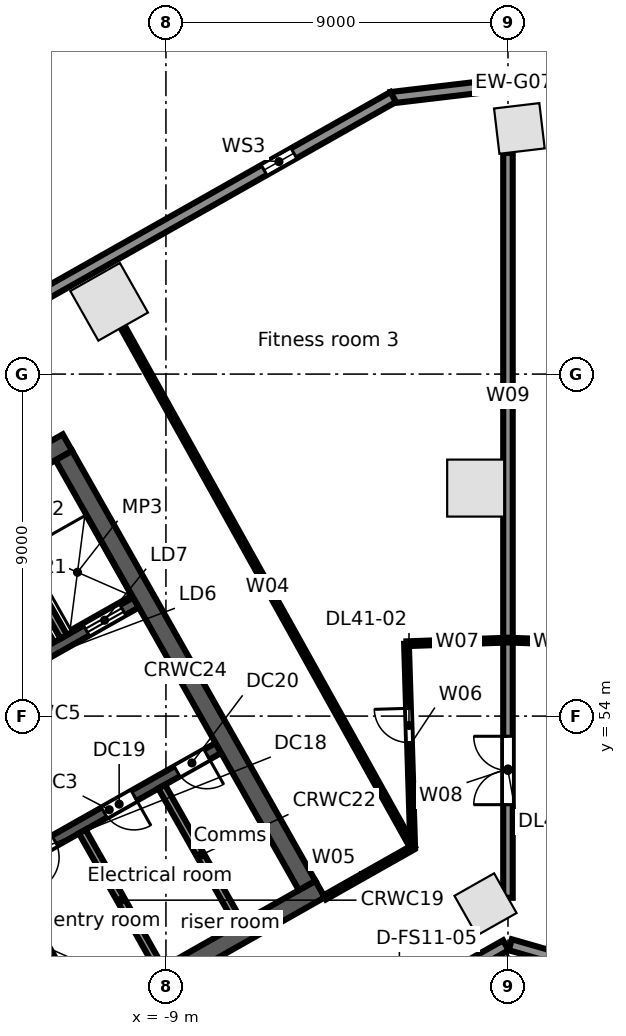
"""IFC4 building model, lengths in metres.
Left out: names, types, materials, properties, quantities, classifications, styles, units other than length and angle.
Written with IfcOpenShell. Run it as: python <this file> out.ifc"""

import sys

from ifc_helpers import new_model, si_unit, direction, frame, frame_2d, origin, origin_2d, place, context, subcontext, project, spatial, rectangle, extrude, element, fill, save


model = new_model("IFC4")
c1 = context("Model", 3, precision=1e-05, world=origin(), true_north=direction((0.0, 1.0)))
c2 = subcontext(c1, "Body", "Model", "MODEL_VIEW")
j1 = project(units=[si_unit("LENGTHUNIT", "METRE"), si_unit("PLANEANGLEUNIT", "RADIAN")], contexts=[c1])
p1 = place(None, origin())
s1 = spatial("IfcSite", under=j1, at=p1, CompositionType="ELEMENT")
p2 = place(p1, origin())
s2 = spatial("IfcBuilding", under=s1, at=p2, CompositionType="ELEMENT")
p3 = place(p2, frame((0.0, 0.0, 190.9)))
s3 = spatial("IfcBuildingStorey", under=s2, at=p3, CompositionType="ELEMENT", Elevation=190.9)
p4 = place(p3, frame((0.3, 69.464, 0.0), z_axis=(0.0, 0.0, 1.0), x_axis=(-0.993068456955, -0.117537397458, 0.0)))
e1 = element("IfcColumn", 1, at=p4, inside=s3, PredefinedType="COLUMN", context=c2, shape_type="SweptSolid", body=[
    extrude(rectangle(XDim=1.2, YDim=1.2, at=origin_2d()), origin(), (0.0, 0.0, 1.0), 4.0),
])
p5 = place(p3, frame((-10.495, 64.902, 0.0), z_axis=(0.0, 0.0, 1.0), x_axis=(-0.87035569594, -0.492423560103, 0.0)))
e2 = element("IfcColumn", 2, at=p5, inside=s3, PredefinedType="COLUMN", context=c2, shape_type="SweptSolid", body=[
    extrude(rectangle(XDim=1.5, YDim=1.5, at=origin_2d()), origin(), (0.0, 0.0, 1.0), 4.0),
])
p6 = place(p3, frame((-0.591, 49.044, 0.0), z_axis=(0.0, 0.0, 1.0), x_axis=(0.87035569594, 0.492423560103, 0.0)))
e3 = element("IfcColumn", 3, at=p6, inside=s3, PredefinedType="COLUMN", context=c2, shape_type="SweptSolid", body=[
    extrude(rectangle(XDim=1.2, YDim=1.2, at=origin_2d()), origin(), (0.0, 0.0, 1.0), 4.0),
])
p7 = place(p3, frame((-0.85, 60.0, 0.0), z_axis=(0.0, 0.0, 1.0), x_axis=(0.0, 1.0, 0.0)))
e4 = element("IfcColumn", 4, at=p7, inside=s3, PredefinedType="COLUMN", context=c2, shape_type="SweptSolid", body=[
    extrude(rectangle(XDim=1.5, YDim=1.5, at=origin_2d()), origin(), (0.0, 0.0, 1.0), 4.0),
])
p8 = place(p3, frame((-0.055, 47.969, 0.0), z_axis=(0.0, 0.0, 1.0), x_axis=(-0.870355730478, -0.492423499058, 0.0)))
e5 = element("IfcWall", 5, at=p8, inside=s3, PredefinedType="STANDARD", context=c2, shape_type="SweptSolid", body=[
    extrude(rectangle(XDim=43.75, YDim=0.3, at=frame_2d((21.875, 0.0))), origin(), (0.0, 0.0, 1.0), 3.68),
])
p9 = place(p8, frame((39.977, 0.0, 0.6)))
e6 = element("IfcOpeningElement", 6, at=p9, cuts=e5, PredefinedType="OPENING", context=c2, shape_type="SweptSolid", body=[
    extrude(rectangle(XDim=0.9, YDim=2.4, at=frame_2d((0.45, 1.2))), frame((0.0, 0.16, 0.0), z_axis=(0.0, -1.0, 0.0), x_axis=(1.0, 0.0, 0.0)), (0.0, 0.0, 1.0), 0.32),
])
p10 = place(p8, frame((37.338, 0.0, 0.0)))
e7 = element("IfcOpeningElement", 7, at=p10, cuts=e5, PredefinedType="OPENING", context=c2, shape_type="SweptSolid", body=[
    extrude(rectangle(XDim=1.8, YDim=2.4, at=frame_2d((0.9, 1.2))), frame((0.0, 0.16, 0.0), z_axis=(0.0, -1.0, 0.0), x_axis=(1.0, 0.0, 0.0)), (0.0, 0.0, 1.0), 0.32),
])
p11 = place(p8, frame((31.222, 0.0, 0.6)))
e8 = element("IfcOpeningElement", 8, at=p11, cuts=e5, PredefinedType="OPENING", context=c2, shape_type="SweptSolid", body=[
    extrude(rectangle(XDim=0.9, YDim=2.4, at=frame_2d((0.45, 1.2))), frame((0.0, 0.16, 0.0), z_axis=(0.0, -1.0, 0.0), x_axis=(1.0, 0.0, 0.0)), (0.0, 0.0, 1.0), 0.32),
])
p12 = place(p8, frame((28.584, 0.0, 0.0)))
e9 = element("IfcOpeningElement", 9, at=p12, cuts=e5, PredefinedType="OPENING", context=c2, shape_type="SweptSolid", body=[
    extrude(rectangle(XDim=1.8, YDim=2.4, at=frame_2d((0.9, 1.2))), frame((0.0, 0.16, 0.0), z_axis=(0.0, -1.0, 0.0), x_axis=(1.0, 0.0, 0.0)), (0.0, 0.0, 1.0), 0.32),
])
p13 = place(p8, frame((22.468, 0.0, 0.6)))
e10 = element("IfcOpeningElement", 10, at=p13, cuts=e5, PredefinedType="OPENING", context=c2, shape_type="SweptSolid", body=[
    extrude(rectangle(XDim=0.9, YDim=2.4, at=frame_2d((0.45, 1.2))), frame((0.0, 0.16, 0.0), z_axis=(0.0, -1.0, 0.0), x_axis=(1.0, 0.0, 0.0)), (0.0, 0.0, 1.0), 0.32),
])
p14 = place(p8, frame((19.829, 0.0, 0.0)))
e11 = element("IfcOpeningElement", 11, at=p14, cuts=e5, PredefinedType="OPENING", context=c2, shape_type="SweptSolid", body=[
    extrude(rectangle(XDim=1.8, YDim=2.4, at=frame_2d((0.9, 1.2))), frame((0.0, 0.16, 0.0), z_axis=(0.0, -1.0, 0.0), x_axis=(1.0, 0.0, 0.0)), (0.0, 0.0, 1.0), 0.32),
])
p15 = place(p8, frame((13.713, 0.0, 0.6)))
e12 = element("IfcOpeningElement", 12, at=p15, cuts=e5, PredefinedType="OPENING", context=c2, shape_type="SweptSolid", body=[
    extrude(rectangle(XDim=0.9, YDim=2.4, at=frame_2d((0.45, 1.2))), frame((0.0, 0.16, 0.0), z_axis=(0.0, -1.0, 0.0), x_axis=(1.0, 0.0, 0.0)), (0.0, 0.0, 1.0), 0.32),
])
p16 = place(p8, frame((11.075, 0.0, 0.0)))
e13 = element("IfcOpeningElement", 13, at=p16, cuts=e5, PredefinedType="OPENING", context=c2, shape_type="SweptSolid", body=[
    extrude(rectangle(XDim=1.8, YDim=2.4, at=frame_2d((0.9, 1.2))), frame((0.0, 0.16, 0.0), z_axis=(0.0, -1.0, 0.0), x_axis=(1.0, 0.0, 0.0)), (0.0, 0.0, 1.0), 0.32),
])
p17 = place(p8, frame((4.959, 0.0, 0.6)))
e14 = element("IfcOpeningElement", 14, at=p17, cuts=e5, PredefinedType="OPENING", context=c2, shape_type="SweptSolid", body=[
    extrude(rectangle(XDim=0.9, YDim=2.4, at=frame_2d((0.45, 1.2))), frame((0.0, 0.16, 0.0), z_axis=(0.0, -1.0, 0.0), x_axis=(1.0, 0.0, 0.0)), (0.0, 0.0, 1.0), 0.32),
])
p18 = place(p8, frame((2.32, 0.0, 0.0)))
e15 = element("IfcOpeningElement", 15, at=p18, cuts=e5, PredefinedType="OPENING", context=c2, shape_type="SweptSolid", body=[
    extrude(rectangle(XDim=1.8, YDim=2.4, at=frame_2d((0.9, 1.2))), frame((0.0, 0.16, 0.0), z_axis=(0.0, -1.0, 0.0), x_axis=(1.0, 0.0, 0.0)), (0.0, 0.0, 1.0), 0.32),
])
p19 = place(p3, frame((24.042, 41.106, 0.0), z_axis=(0.0, 0.0, 1.0), x_axis=(-0.961261693976, 0.275637362661, 0.0)))
e16 = element("IfcWall", 16, at=p19, inside=s3, PredefinedType="STANDARD", context=c2, shape_type="SweptSolid", body=[
    extrude(rectangle(XDim=24.948, YDim=0.3, at=frame_2d((12.474, 0.0))), origin(), (0.0, 0.0, 1.0), 3.68),
])
p20 = place(p19, frame((21.441, 0.0, 0.6)))
e17 = element("IfcOpeningElement", 17, at=p20, cuts=e16, PredefinedType="OPENING", context=c2, shape_type="SweptSolid", body=[
    extrude(rectangle(XDim=0.9, YDim=2.4, at=frame_2d((0.45, 1.2))), frame((0.0, 0.16, 0.0), z_axis=(0.0, -1.0, 0.0), x_axis=(1.0, 0.0, 0.0)), (0.0, 0.0, 1.0), 0.32),
])
p21 = place(p19, frame((13.121, 0.0, 0.6)))
e18 = element("IfcOpeningElement", 18, at=p21, cuts=e16, PredefinedType="OPENING", context=c2, shape_type="SweptSolid", body=[
    extrude(rectangle(XDim=0.9, YDim=2.4, at=frame_2d((0.45, 1.2))), frame((0.0, 0.16, 0.0), z_axis=(0.0, -1.0, 0.0), x_axis=(1.0, 0.0, 0.0)), (0.0, 0.0, 1.0), 0.32),
])
p22 = place(p19, frame((10.591, 0.0, 0.0)))
e19 = element("IfcOpeningElement", 19, at=p22, cuts=e16, PredefinedType="OPENING", context=c2, shape_type="SweptSolid", body=[
    extrude(rectangle(XDim=1.8, YDim=2.4, at=frame_2d((0.9, 1.2))), frame((0.0, 0.16, 0.0), z_axis=(0.0, -1.0, 0.0), x_axis=(1.0, 0.0, 0.0)), (0.0, 0.0, 1.0), 0.32),
])
p23 = place(p19, frame((4.8, 0.0, 0.6)))
e20 = element("IfcOpeningElement", 20, at=p23, cuts=e16, PredefinedType="OPENING", context=c2, shape_type="SweptSolid", body=[
    extrude(rectangle(XDim=0.9, YDim=2.4, at=frame_2d((0.45, 1.2))), frame((0.0, 0.16, 0.0), z_axis=(0.0, -1.0, 0.0), x_axis=(1.0, 0.0, 0.0)), (0.0, 0.0, 1.0), 0.32),
])
p24 = place(p19, frame((2.27, 0.0, 0.0)))
e21 = element("IfcOpeningElement", 21, at=p24, cuts=e16, PredefinedType="OPENING", context=c2, shape_type="SweptSolid", body=[
    extrude(rectangle(XDim=1.8, YDim=2.4, at=frame_2d((0.9, 1.2))), frame((0.0, 0.16, 0.0), z_axis=(0.0, -1.0, 0.0), x_axis=(1.0, 0.0, 0.0)), (0.0, 0.0, 1.0), 0.32),
])
p25 = place(p3, frame((-3.076, 70.273, 0.0), z_axis=(0.0, 0.0, 1.0), x_axis=(0.993067743007, 0.117543429416, 0.0)))
e22 = element("IfcWall", 22, at=p25, inside=s3, PredefinedType="STANDARD", context=c2, shape_type="SweptSolid", body=[
    extrude(rectangle(XDim=6.516, YDim=0.3, at=frame_2d((3.258, 0.0))), origin(), (0.0, 0.0, 1.0), 3.68),
])
p26 = place(p3, frame((-58.745, 38.764, 0.0), z_axis=(0.0, 0.0, 1.0), x_axis=(0.870355811726, 0.492423355453, 0.0)))
e23 = element("IfcWall", 23, at=p26, inside=s3, PredefinedType="STANDARD", context=c2, shape_type="SweptSolid", body=[
    extrude(rectangle(XDim=64.025, YDim=0.3, at=frame_2d((32.013, 0.0))), origin(), (0.0, 0.0, 1.0), 3.68),
])
p27 = place(p26, frame((60.122, 0.0, 0.6)))
e24 = element("IfcOpeningElement", 24, at=p27, cuts=e23, PredefinedType="OPENING", context=c2, shape_type="SweptSolid", body=[
    extrude(rectangle(XDim=0.9, YDim=2.4, at=frame_2d((0.45, 1.2))), frame((0.0, 0.16, 0.0), z_axis=(0.0, -1.0, 0.0), x_axis=(1.0, 0.0, 0.0)), (0.0, 0.0, 1.0), 0.32),
])
p28 = place(p26, frame((50.992, 0.0, 0.6)))
e25 = element("IfcOpeningElement", 25, at=p28, cuts=e23, PredefinedType="OPENING", context=c2, shape_type="SweptSolid", body=[
    extrude(rectangle(XDim=0.9, YDim=2.4, at=frame_2d((0.45, 1.2))), frame((0.0, 0.16, 0.0), z_axis=(0.0, -1.0, 0.0), x_axis=(1.0, 0.0, 0.0)), (0.0, 0.0, 1.0), 0.32),
])
p29 = place(p26, frame((41.862, 0.0, 0.6)))
e26 = element("IfcOpeningElement", 26, at=p29, cuts=e23, PredefinedType="OPENING", context=c2, shape_type="SweptSolid", body=[
    extrude(rectangle(XDim=0.9, YDim=2.4, at=frame_2d((0.45, 1.2))), frame((0.0, 0.16, 0.0), z_axis=(0.0, -1.0, 0.0), x_axis=(1.0, 0.0, 0.0)), (0.0, 0.0, 1.0), 0.32),
])
p30 = place(p26, frame((32.732, 0.0, 0.6)))
e27 = element("IfcOpeningElement", 27, at=p30, cuts=e23, PredefinedType="OPENING", context=c2, shape_type="SweptSolid", body=[
    extrude(rectangle(XDim=0.9, YDim=2.4, at=frame_2d((0.45, 1.2))), frame((0.0, 0.16, 0.0), z_axis=(0.0, -1.0, 0.0), x_axis=(1.0, 0.0, 0.0)), (0.0, 0.0, 1.0), 0.32),
])
p31 = place(p26, frame((23.602, 0.0, 0.6)))
e28 = element("IfcOpeningElement", 28, at=p31, cuts=e23, PredefinedType="OPENING", context=c2, shape_type="SweptSolid", body=[
    extrude(rectangle(XDim=0.9, YDim=2.4, at=frame_2d((0.45, 1.2))), frame((0.0, 0.16, 0.0), z_axis=(0.0, -1.0, 0.0), x_axis=(1.0, 0.0, 0.0)), (0.0, 0.0, 1.0), 0.32),
])
p32 = place(p26, frame((14.472, 0.0, 0.6)))
e29 = element("IfcOpeningElement", 29, at=p32, cuts=e23, PredefinedType="OPENING", context=c2, shape_type="SweptSolid", body=[
    extrude(rectangle(XDim=0.9, YDim=2.4, at=frame_2d((0.45, 1.2))), frame((0.0, 0.16, 0.0), z_axis=(0.0, -1.0, 0.0), x_axis=(1.0, 0.0, 0.0)), (0.0, 0.0, 1.0), 0.32),
])
p33 = place(p26, frame((5.342, 0.0, 0.6)))
e30 = element("IfcOpeningElement", 30, at=p33, cuts=e23, PredefinedType="OPENING", context=c2, shape_type="SweptSolid", body=[
    extrude(rectangle(XDim=0.9, YDim=2.4, at=frame_2d((0.45, 1.2))), frame((0.0, 0.16, 0.0), z_axis=(0.0, -1.0, 0.0), x_axis=(1.0, 0.0, 0.0)), (0.0, 0.0, 1.0), 0.32),
])
p34 = place(p3, frame((-18.0, 42.061, 0.0), z_axis=(0.0, 0.0, 1.0), x_axis=(0.870356627484, 0.492421913601, 0.0)))
e31 = element("IfcWall", 31, at=p34, inside=s3, PredefinedType="SOLIDWALL", context=c2, shape_type="SweptSolid", body=[
    extrude(rectangle(XDim=15.0, YDim=0.5, at=frame_2d((7.5, 0.0))), origin(), (0.0, 0.0, 1.0), 3.68),
])
p35 = place(p34, frame((6.1, 0.0, 0.0)))
e32 = element("IfcOpeningElement", 32, at=p35, cuts=e31, PredefinedType="OPENING", context=c2, shape_type="SweptSolid", body=[
    extrude(rectangle(XDim=1.2, YDim=2.1, at=frame_2d((0.6, 1.05))), frame((0.0, 0.26, 0.0), z_axis=(0.0, -1.0, 0.0), x_axis=(1.0, 0.0, 0.0)), (0.0, 0.0, 1.0), 0.52),
])
p36 = place(p3, frame((-13.365, 49.911, 0.0), z_axis=(0.0, 0.0, 1.0), x_axis=(0.870356769198, 0.492421663121, 0.0)))
e33 = element("IfcWall", 33, at=p36, inside=s3, PredefinedType="SOLIDWALL", context=c2, shape_type="SweptSolid", body=[
    extrude(rectangle(XDim=6.6, YDim=0.3, at=frame_2d((3.3, 0.0))), origin(), (0.0, 0.0, 1.0), 3.68),
])
p37 = place(p36, frame((0.75, 0.0, 0.0)))
e34 = element("IfcOpeningElement", 34, at=p37, cuts=e33, PredefinedType="OPENING", context=c2, shape_type="SweptSolid", body=[
    extrude(rectangle(XDim=0.9, YDim=2.1, at=frame_2d((0.45, 1.05))), frame((0.0, 0.16, 0.0), z_axis=(0.0, -1.0, 0.0), x_axis=(1.0, 0.0, 0.0)), (0.0, 0.0, 1.0), 0.32),
])
p38 = place(p36, frame((3.15, 0.0, 0.0)))
e35 = element("IfcOpeningElement", 35, at=p38, cuts=e33, PredefinedType="OPENING", context=c2, shape_type="SweptSolid", body=[
    extrude(rectangle(XDim=0.9, YDim=2.1, at=frame_2d((0.45, 1.05))), frame((0.0, 0.16, 0.0), z_axis=(0.0, -1.0, 0.0), x_axis=(1.0, 0.0, 0.0)), (0.0, 0.0, 1.0), 0.32),
])
p39 = place(p36, frame((5.35, 0.0, 0.0)))
e36 = element("IfcOpeningElement", 36, at=p39, cuts=e33, PredefinedType="OPENING", context=c2, shape_type="SweptSolid", body=[
    extrude(rectangle(XDim=0.9, YDim=2.1, at=frame_2d((0.45, 1.05))), frame((0.0, 0.16, 0.0), z_axis=(0.0, -1.0, 0.0), x_axis=(1.0, 0.0, 0.0)), (0.0, 0.0, 1.0), 0.32),
])
p40 = place(p3, frame((-15.618, 53.691, 0.0), z_axis=(0.0, 0.0, 1.0), x_axis=(0.870363236066, 0.492410232738, 0.0)))
e37 = element("IfcWall", 37, at=p40, inside=s3, PredefinedType="SOLIDWALL", context=c2, shape_type="SweptSolid", body=[
    extrude(rectangle(XDim=6.7, YDim=0.3, at=frame_2d((3.35, 0.0))), origin(), (0.0, 0.0, 1.0), 3.68),
])
p41 = place(p40, frame((0.6, 0.0, 0.0)))
e38 = element("IfcOpeningElement", 38, at=p41, cuts=e37, PredefinedType="OPENING", context=c2, shape_type="SweptSolid", body=[
    extrude(rectangle(XDim=1.1, YDim=2.1, at=frame_2d((0.55, 1.05))), frame((0.0, 0.16, 0.0), z_axis=(0.0, -1.0, 0.0), x_axis=(1.0, 0.0, 0.0)), (0.0, 0.0, 1.0), 0.32),
])
p42 = place(p40, frame((2.9, 0.0, 0.0)))
e39 = element("IfcOpeningElement", 39, at=p42, cuts=e37, PredefinedType="OPENING", context=c2, shape_type="SweptSolid", body=[
    extrude(rectangle(XDim=1.1, YDim=2.1, at=frame_2d((0.55, 1.05))), frame((0.0, 0.16, 0.0), z_axis=(0.0, -1.0, 0.0), x_axis=(1.0, 0.0, 0.0)), (0.0, 0.0, 1.0), 0.32),
])
p43 = place(p40, frame((5.2, 0.0, 0.0)))
e40 = element("IfcOpeningElement", 40, at=p43, cuts=e37, PredefinedType="OPENING", context=c2, shape_type="SweptSolid", body=[
    extrude(rectangle(XDim=1.1, YDim=2.1, at=frame_2d((0.55, 1.05))), frame((0.0, 0.16, 0.0), z_axis=(0.0, -1.0, 0.0), x_axis=(1.0, 0.0, 0.0)), (0.0, 0.0, 1.0), 0.32),
])
p44 = place(p3, frame((-24.647, 53.811, 0.0), z_axis=(0.0, 0.0, 1.0), x_axis=(0.87034965173, 0.492434243055, 0.0)))
e41 = element("IfcWall", 41, at=p44, inside=s3, PredefinedType="SOLIDWALL", context=c2, shape_type="SweptSolid", body=[
    extrude(rectangle(XDim=15.0, YDim=0.5, at=frame_2d((7.5, 0.0))), origin(), (0.0, 0.0, 1.0), 3.68),
])
p45 = place(p3, frame((-13.291, 49.781, 0.0), z_axis=(0.0, 0.0, 1.0), x_axis=(0.492396453737, -0.870371031427, 0.0)))
e42 = element("IfcWall", 42, at=p45, inside=s3, PredefinedType="SOLIDWALL", context=c2, shape_type="SweptSolid", body=[
    extrude(rectangle(XDim=4.15, YDim=0.3, at=frame_2d((2.075, 0.0))), origin(), (0.0, 0.0, 1.0), 3.68),
])
p46 = place(p3, frame((-11.202, 50.962, 0.0), z_axis=(0.0, 0.0, 1.0), x_axis=(0.492441017253, -0.870345818929, 0.0)))
e43 = element("IfcWall", 43, at=p46, inside=s3, PredefinedType="PARTITIONING", context=c2, shape_type="SweptSolid", body=[
    extrude(rectangle(XDim=4.15, YDim=0.2, at=frame_2d((2.075, 0.0))), origin(), (0.0, 0.0, 1.0), 3.68),
])
p47 = place(p3, frame((-13.732, 59.699, 0.0), z_axis=(0.0, 0.0, 1.0), x_axis=(0.492396453737, -0.870371031427, 0.0)))
e44 = element("IfcWall", 44, at=p47, inside=s3, PredefinedType="SOLIDWALL", context=c2, shape_type="SweptSolid", body=[
    extrude(rectangle(XDim=4.15, YDim=0.2, at=frame_2d((2.075, 0.0))), origin(), (0.0, 0.0, 1.0), 3.68),
])
p48 = place(p3, frame((-9.113, 52.144, 0.0), z_axis=(0.0, 0.0, 1.0), x_axis=(0.492396453737, -0.870371031427, 0.0)))
e45 = element("IfcWall", 45, at=p48, inside=s3, PredefinedType="PARTITIONING", context=c2, shape_type="SweptSolid", body=[
    extrude(rectangle(XDim=4.15, YDim=0.2, at=frame_2d((2.075, 0.0))), origin(), (0.0, 0.0, 1.0), 3.68),
])
p49 = place(p3, frame((-11.687, 60.856, 0.0), z_axis=(0.0, 0.0, 1.0), x_axis=(0.492427267353, -0.870353598469, 0.0)))
e46 = element("IfcWall", 46, at=p49, inside=s3, PredefinedType="SOLIDWALL", context=c2, shape_type="SweptSolid", body=[
    extrude(rectangle(XDim=13.0, YDim=0.5, at=frame_2d((6.5, 0.0))), origin(), (0.0, 0.0, 1.0), 3.68),
])
p50 = place(p3, frame((-10.137, 64.243, 0.0), z_axis=(0.0, 0.0, 1.0), x_axis=(0.486452862603, -0.873706822948, 0.0)))
e47 = element("IfcWall", 47, at=p50, inside=s3, PredefinedType="PARTITIONING", context=c2, shape_type="SweptSolid", body=[
    extrude(rectangle(XDim=15.685, YDim=0.125, at=frame_2d((7.842, 0.0))), origin(), (0.0, 0.0, 1.0), 2.748),
])
p51 = place(p3, frame((-4.821, 49.23, 0.0), z_axis=(0.0, 0.0, 1.0), x_axis=(0.870371217631, 0.492396124598, 0.0)))
e48 = element("IfcWall", 48, at=p51, inside=s3, PredefinedType="PARTITIONING", context=c2, shape_type="SweptSolid", body=[
    extrude(rectangle(XDim=2.659, YDim=0.125, at=frame_2d((1.329, 0.0))), origin(), (0.0, 0.0, 1.0), 3.68),
])
p52 = place(p3, frame((-2.67, 55.904, 0.0), z_axis=(0.0, 0.0, 1.0), x_axis=(0.030338701418, -0.999539675649, 0.0)))
e49 = element("IfcWall", 49, at=p52, inside=s3, PredefinedType="PARTITIONING", context=c2, shape_type="SweptSolid", body=[
    extrude(rectangle(XDim=5.367, YDim=0.125, at=frame_2d((2.684, 0.0))), origin(), (0.0, 0.0, 1.0), 3.68),
])
p53 = place(p52, frame((1.7, 0.0, 0.0)))
e50 = element("IfcOpeningElement", 50, at=p53, cuts=e49, PredefinedType="OPENING", context=c2, shape_type="SweptSolid", body=[
    extrude(rectangle(XDim=0.9, YDim=2.1, at=frame_2d((0.45, 1.05))), frame((0.0, 0.073, 0.0), z_axis=(0.0, -1.0, 0.0), x_axis=(1.0, 0.0, 0.0)), (0.0, 0.0, 1.0), 0.145),
])
p54 = place(p3, frame((-2.67, 55.904, 0.0), z_axis=(0.0, 0.0, 1.0), x_axis=(0.999354913865, 0.03591317494, 0.0)))
e51 = element("IfcWall", 51, at=p54, inside=s3, PredefinedType="PARTITIONING", context=c2, shape_type="SweptSolid", body=[
    extrude(rectangle(XDim=2.672, YDim=0.125, at=frame_2d((1.336, 0.0))), origin(), (0.0, 0.0, 1.0), 2.748),
])
p55 = place(p3, frame((0.0, 49.219, 0.0), z_axis=(0.0, 0.0, 1.0), x_axis=(0.0, 1.0, 0.0)))
e52 = element("IfcWall", 52, at=p55, inside=s3, PredefinedType="PARTITIONING", context=c2, shape_type="SweptSolid", body=[
    extrude(rectangle(XDim=6.781, YDim=0.25, at=frame_2d((3.391, 0.0))), origin(), (0.0, 0.0, 1.0), 3.68),
])
p56 = place(p55, frame((2.45, 0.0, 0.0)))
e53 = element("IfcOpeningElement", 53, at=p56, cuts=e52, PredefinedType="OPENING", context=c2, shape_type="SweptSolid", body=[
    extrude(rectangle(XDim=1.8, YDim=2.1, at=frame_2d((0.9, 1.05))), frame((0.0, 0.135, 0.0), z_axis=(0.0, -1.0, 0.0), x_axis=(1.0, 0.0, 0.0)), (0.0, 0.0, 1.0), 0.27),
])
p57 = place(p3, frame((0.0, 56.0, 0.0), z_axis=(0.0, 0.0, 1.0), x_axis=(0.0, 1.0, 0.0)))
e54 = element("IfcWall", 54, at=p57, inside=s3, PredefinedType="PARTITIONING", context=c2, shape_type="SweptSolid", body=[
    extrude(rectangle(XDim=12.824, YDim=0.25, at=frame_2d((6.412, 0.0))), origin(), (0.0, 0.0, 1.0), 2.748),
])
p58 = place(p3, frame((0.0, 56.0, 0.0), z_axis=(0.0, 0.0, 1.0), x_axis=(0.999349313684, -0.036068673934, 0.0)))
e55 = element("IfcWall", 55, at=p58, inside=s3, PredefinedType="PARTITIONING", context=c2, shape_type="SweptSolid", body=[
    extrude(rectangle(XDim=2.471, YDim=0.125, at=frame_2d((1.235, 0.0))), origin(), (0.0, 0.0, 1.0), 3.68),
])
p59 = place(p27, origin())
e56 = element("IfcWindow", 56, at=p59, inside=s3, PartitioningType="SINGLE_PANEL", PredefinedType="WINDOW", context=c2, shape_type="SweptSolid", body=[
    extrude(rectangle(XDim=0.9, YDim=2.4, at=frame_2d((0.45, 1.2))), frame((0.0, 0.03, 0.0), z_axis=(0.0, -1.0, 0.0), x_axis=(1.0, 0.0, 0.0)), (0.0, 0.0, 1.0), 0.06),
])
fill(e24, e56)
p60 = place(p43, origin())
e57 = element("IfcDoor", 57, at=p60, inside=s3, OperationType="DOUBLE_DOOR_SLIDING", PredefinedType="DOOR", context=c2, shape_type="SweptSolid", body=[
    extrude(rectangle(XDim=1.1, YDim=2.1, at=frame_2d((0.55, 1.05))), frame((0.0, 0.025, 0.0), z_axis=(0.0, -1.0, 0.0), x_axis=(1.0, 0.0, 0.0)), (0.0, 0.0, 1.0), 0.05),
])
fill(e40, e57)
p61 = place(p37, frame((0.9, 0.0, 0.0), z_axis=(0.0, 0.0, 1.0), x_axis=(-1.0, 0.0, 0.0)))
e58 = element("IfcDoor", 58, at=p61, inside=s3, OperationType="SINGLE_SWING_RIGHT", PredefinedType="DOOR", context=c2, shape_type="SweptSolid", body=[
    extrude(rectangle(XDim=0.9, YDim=2.1, at=frame_2d((0.45, 1.05))), frame((0.0, 0.025, 0.0), z_axis=(0.0, -1.0, 0.0), x_axis=(1.0, 0.0, 0.0)), (0.0, 0.0, 1.0), 0.05),
])
fill(e34, e58)
p62 = place(p38, frame((0.9, 0.0, 0.0), z_axis=(0.0, 0.0, 1.0), x_axis=(-1.0, 0.0, 0.0)))
e59 = element("IfcDoor", 59, at=p62, inside=s3, OperationType="SINGLE_SWING_LEFT", PredefinedType="DOOR", context=c2, shape_type="SweptSolid", body=[
    extrude(rectangle(XDim=0.9, YDim=2.1, at=frame_2d((0.45, 1.05))), frame((0.0, 0.025, 0.0), z_axis=(0.0, -1.0, 0.0), x_axis=(1.0, 0.0, 0.0)), (0.0, 0.0, 1.0), 0.05),
])
fill(e35, e59)
p63 = place(p39, frame((0.9, 0.0, 0.0), z_axis=(0.0, 0.0, 1.0), x_axis=(-1.0, 0.0, 0.0)))
e60 = element("IfcDoor", 60, at=p63, inside=s3, OperationType="SINGLE_SWING_LEFT", PredefinedType="DOOR", context=c2, shape_type="SweptSolid", body=[
    extrude(rectangle(XDim=0.9, YDim=2.1, at=frame_2d((0.45, 1.05))), frame((0.0, 0.025, 0.0), z_axis=(0.0, -1.0, 0.0), x_axis=(1.0, 0.0, 0.0)), (0.0, 0.0, 1.0), 0.05),
])
fill(e36, e60)
p64 = place(p53, frame((0.9, 0.0, 0.0), z_axis=(0.0, 0.0, 1.0), x_axis=(-1.0, 0.0, 0.0)))
e61 = element("IfcDoor", 61, at=p64, inside=s3, OperationType="SINGLE_SWING_RIGHT", PredefinedType="DOOR", context=c2, shape_type="SweptSolid", body=[
    extrude(rectangle(XDim=0.9, YDim=2.1, at=frame_2d((0.45, 1.05))), frame((0.0, 0.025, 0.0), z_axis=(0.0, -1.0, 0.0), x_axis=(1.0, 0.0, 0.0)), (0.0, 0.0, 1.0), 0.05),
])
fill(e50, e61)
p65 = place(p56, origin())
e62 = element("IfcDoor", 62, at=p65, inside=s3, OperationType="DOUBLE_DOOR_SINGLE_SWING", PredefinedType="DOOR", context=c2, shape_type="SweptSolid", body=[
    extrude(rectangle(XDim=1.8, YDim=2.1, at=frame_2d((0.9, 1.05))), frame((0.0, 0.025, 0.0), z_axis=(0.0, -1.0, 0.0), x_axis=(1.0, 0.0, 0.0)), (0.0, 0.0, 1.0), 0.05),
])
fill(e53, e62)
save(model, sys.argv[1])
